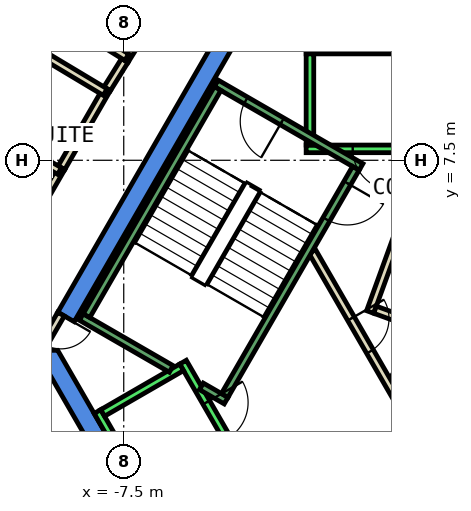
"""IFC4 building model, lengths in metres.
Left out: names, types, materials, properties, quantities, classifications, styles, units other than length and angle.
Written with IfcOpenShell. Run it as: python <this file> out.ifc"""

import sys

from ifc_helpers import new_model, si_unit, direction, frame, frame_2d, origin, place, context, subcontext, project, spatial, polyline, rectangle, outline, extrude, element, fill, save


model = new_model("IFC4")
c1 = context("Model", 3, precision=1e-05, world=origin(), true_north=direction((0.0, 1.0)))
c2 = subcontext(c1, "Body", "Model", "MODEL_VIEW")
j1 = project(units=[si_unit("LENGTHUNIT", "METRE"), si_unit("PLANEANGLEUNIT", "RADIAN")], contexts=[c1])
p1 = place(None, origin())
s1 = spatial("IfcSite", under=j1, at=p1, CompositionType="ELEMENT")
p2 = place(p1, origin())
s2 = spatial("IfcBuilding", under=s1, at=p2, CompositionType="ELEMENT")
p3 = place(p2, frame((0.0, 0.0, 286.4)))
s3 = spatial("IfcBuildingStorey", under=s2, at=p3, CompositionType="ELEMENT", Elevation=286.4)
p4 = place(p3, frame((0.0, 0.0, -0.6)))
e1 = element("IfcWall", 1, at=p4, inside=s3, PredefinedType="SHEAR", context=c2, shape_type="SweptSolid", body=[
    extrude(outline(polyline([(-9.236, 3.502), (-8.803, 3.253), (-4.619, 10.5), (-4.907, 11.0), (-9.236, 3.502)])), origin(), (0.0, 0.0, 1.0), 3.86),
])
p5 = place(p3, frame((0.0, 0.0, -0.6)))
e2 = element("IfcWall", 2, at=p5, inside=s3, PredefinedType="SHEAR", context=c2, shape_type="SweptSolid", body=[
    extrude(outline(polyline([(-9.815, 2.5), (-4.907, -6.0), (-4.619, -5.5), (-9.238, 2.5), (-9.815, 2.5)])), origin(), (0.0, 0.0, 1.0), 3.86),
])
p6 = place(p3, frame((-0.196, 5.764, 0.0), z_axis=(0.0, 0.0, 1.0), x_axis=(-0.34165322761, -0.939826086073, 0.0)))
e3 = element("IfcWall", 3, at=p6, inside=s3, PredefinedType="PARTITIONING", context=c2, shape_type="SweptSolid", body=[
    extrude(rectangle(XDim=2.4, YDim=0.2, at=frame_2d((1.2, 0.0))), origin(), (0.0, 0.0, 1.0), 3.26),
])
p7 = place(p3, frame((-0.888, 3.568, 0.0), z_axis=(0.0, 0.0, 1.0), x_axis=(0.939685034098, -0.34204098686, 0.0)))
e4 = element("IfcWall", 4, at=p7, inside=s3, PredefinedType="PARTITIONING", context=c2, shape_type="SweptSolid", body=[
    extrude(rectangle(XDim=2.237, YDim=0.2, at=frame_2d((1.119, 0.0))), origin(), (0.0, 0.0, 1.0), 3.26),
])
p8 = place(p3, frame((-7.937, 9.38, 0.0), z_axis=(0.0, 0.0, 1.0), x_axis=(0.52850186976, 0.848932137252, 0.0)))
e5 = element("IfcWall", 5, at=p8, inside=s3, PredefinedType="PARTITIONING", context=c2, shape_type="SweptSolid", body=[
    extrude(rectangle(XDim=0.88, YDim=0.2, at=frame_2d((0.44, 0.0))), origin(), (0.0, 0.0, 1.0), 3.26),
])
p9 = place(p3, frame((-7.472, 10.127, 0.0), z_axis=(0.0, 0.0, 1.0), x_axis=(0.527707224705, 0.849426326996, 0.0)))
e6 = element("IfcWall", 6, at=p9, inside=s3, PredefinedType="PARTITIONING", context=c2, shape_type="SweptSolid", body=[
    extrude(rectangle(XDim=3.0, YDim=0.2, at=frame_2d((1.5, 0.0))), origin(), (0.0, 0.0, 1.0), 3.26),
])
p10 = place(p3, frame((-12.082, 2.207, 0.0), z_axis=(0.0, 0.0, 1.0), x_axis=(0.500123454404, 0.865954115618, 0.0)))
e7 = element("IfcWall", 7, at=p10, inside=s3, PredefinedType="PARTITIONING", context=c2, shape_type="SweptSolid", body=[
    extrude(rectangle(XDim=5.885, YDim=0.2, at=frame_2d((2.942, 0.0))), origin(), (0.0, 0.0, 1.0), 3.26),
])
p11 = place(p10, frame((2.493, 0.0, 0.0)))
e8 = element("IfcOpeningElement", 8, at=p11, cuts=e7, PredefinedType="OPENING", context=c2, shape_type="SweptSolid", body=[
    extrude(rectangle(XDim=1.0, YDim=2.1, at=frame_2d((0.5, 1.05))), frame((0.0, 0.11, 0.0), z_axis=(0.0, -1.0, 0.0), x_axis=(1.0, 0.0, 0.0)), (0.0, 0.0, 1.0), 0.22),
])
p12 = place(p3, frame((-9.139, 7.303, 0.0), z_axis=(0.0, 0.0, 1.0), x_axis=(0.499869187296, 0.866100915363, 0.0)))
e9 = element("IfcWall", 9, at=p12, inside=s3, PredefinedType="PARTITIONING", context=c2, shape_type="SweptSolid", body=[
    extrude(rectangle(XDim=2.401, YDim=0.2, at=frame_2d((1.2, 0.0))), origin(), (0.0, 0.0, 1.0), 3.26),
])
p13 = place(p3, frame((-0.982, -1.0, 0.0), z_axis=(0.0, 0.0, 1.0), x_axis=(0.50024047865, 0.865886518847, 0.0)))
e10 = element("IfcWall", 10, at=p13, inside=s3, PredefinedType="PARTITIONING", context=c2, shape_type="SweptSolid", body=[
    extrude(rectangle(XDim=1.863, YDim=0.2, at=frame_2d((0.931, 0.0))), origin(), (0.0, 0.0, 1.0), 3.26),
])
p14 = place(p3, frame((-2.54, 5.1, 0.0), z_axis=(0.0, 0.0, 1.0), x_axis=(0.499925051871, -0.866068670783, 0.0)))
e11 = element("IfcWall", 11, at=p14, inside=s3, PredefinedType="PARTITIONING", context=c2, shape_type="SweptSolid", body=[
    extrude(rectangle(XDim=5.181, YDim=0.2, at=frame_2d((2.59, 0.0))), origin(), (0.0, 0.0, 1.0), 3.26),
])
p15 = place(p14, frame((2.04, 0.0, 0.0)))
e12 = element("IfcOpeningElement", 12, at=p15, cuts=e11, PredefinedType="OPENING", context=c2, shape_type="SweptSolid", body=[
    extrude(rectangle(XDim=1.0, YDim=2.1, at=frame_2d((0.5, 1.05))), frame((0.0, 0.11, 0.0), z_axis=(0.0, -1.0, 0.0), x_axis=(1.0, 0.0, 0.0)), (0.0, 0.0, 1.0), 0.22),
])
p16 = place(p3, frame((-9.543, 11.531, 0.0), z_axis=(0.0, 0.0, 1.0), x_axis=(0.849400119549, -0.527749407305, 0.0)))
e13 = element("IfcWall", 13, at=p16, inside=s3, PredefinedType="PARTITIONING", context=c2, shape_type="SweptSolid", body=[
    extrude(rectangle(XDim=2.5, YDim=0.2, at=frame_2d((1.25, 0.0))), origin(), (0.0, 0.0, 1.0), 3.26),
])
for number, where, z_axis, x_axis in (
    (14, (-7.989, 9.295, 0.0), (0.0, 0.0, 1.0), (-0.858, 0.514, 0.0)),
    (15, (-11.181, 8.367, 0.0), (0.0, 0.0, 1.0), (0.866, -0.5, 0.0)),
):
    element("IfcWall", number, at=place(p3, frame(where, z_axis=z_axis, x_axis=x_axis)), inside=s3, PredefinedType="PARTITIONING", context=c2, shape_type="SweptSolid", body=[
        extrude(rectangle(XDim=2.3, YDim=0.2, at=frame_2d((1.15, 0.0))), origin(), (0.0, 0.0, 1.0), 3.26),
    ])
p17 = place(p3, frame((-9.15, 3.452, 0.0), z_axis=(0.0, 0.0, 1.0), x_axis=(-0.500079945886, -0.865979242085, 0.0)))
e16 = element("IfcWall", 16, at=p17, inside=s3, PredefinedType="PARTITIONING", context=c2, shape_type="SweptSolid", body=[
    extrude(rectangle(XDim=0.926, YDim=0.2, at=frame_2d((0.463, 0.0))), origin(), (0.0, 0.0, 1.0), 2.4),
])
p18 = place(p17, frame((0.017, 0.0, 0.0)))
e17 = element("IfcOpeningElement", 17, at=p18, cuts=e16, PredefinedType="OPENING", context=c2, shape_type="SweptSolid", body=[
    extrude(rectangle(XDim=0.9, YDim=2.1, at=frame_2d((0.45, 1.05))), frame((0.0, 0.11, 0.0), z_axis=(0.0, -1.0, 0.0), x_axis=(1.0, 0.0, 0.0)), (0.0, 0.0, 1.0), 0.22),
])
p19 = place(p3, frame((2.7, 7.8, 0.0), z_axis=(0.0, 0.0, 1.0), x_axis=(-1.0, 0.0, 0.0)))
e18 = element("IfcWall", 18, at=p19, inside=s3, PredefinedType="STANDARD", context=c2, shape_type="SweptSolid", body=[
    extrude(rectangle(XDim=5.4, YDim=0.2, at=frame_2d((2.7, 0.0))), origin(), (0.0, 0.0, 1.0), 3.26),
])
p20 = place(p19, frame((1.225, 0.0, 0.0)))
e19 = element("IfcOpeningElement", 19, at=p20, cuts=e18, PredefinedType="OPENING", context=c2, shape_type="SweptSolid", body=[
    extrude(rectangle(XDim=1.1, YDim=2.1, at=frame_2d((0.55, 1.05))), frame((0.0, 0.11, 0.0), z_axis=(0.0, -1.0, 0.0), x_axis=(1.0, 0.0, 0.0)), (0.0, 0.0, 1.0), 0.22),
])
p21 = place(p19, frame((3.075, 0.0, 0.0)))
e20 = element("IfcOpeningElement", 20, at=p21, cuts=e18, PredefinedType="OPENING", context=c2, shape_type="SweptSolid", body=[
    extrude(rectangle(XDim=1.1, YDim=2.1, at=frame_2d((0.55, 1.05))), frame((0.0, 0.11, 0.0), z_axis=(0.0, -1.0, 0.0), x_axis=(1.0, 0.0, 0.0)), (0.0, 0.0, 1.0), 0.22),
])
p22 = place(p3, frame((2.7, 10.4, 0.0), z_axis=(0.0, 0.0, 1.0), x_axis=(-1.0, 0.0, 0.0)))
e21 = element("IfcWall", 21, at=p22, inside=s3, PredefinedType="STANDARD", context=c2, shape_type="SweptSolid", body=[
    extrude(rectangle(XDim=5.4, YDim=0.2, at=frame_2d((2.7, 0.0))), origin(), (0.0, 0.0, 1.0), 3.26),
])
p23 = place(p3, frame((-2.6, 7.9, 0.0), z_axis=(0.0, 0.0, 1.0), x_axis=(0.0, 1.0, 0.0)))
e22 = element("IfcWall", 22, at=p23, inside=s3, PredefinedType="STANDARD", context=c2, shape_type="SweptSolid", body=[
    extrude(rectangle(XDim=2.4, YDim=0.2, at=frame_2d((1.2, 0.0))), origin(), (0.0, 0.0, 1.0), 3.26),
])
p24 = place(p3, frame((-5.94, 2.188, 0.0), z_axis=(0.0, 0.0, 1.0), x_axis=(0.500034260056, -0.866005622828, 0.0)))
e23 = element("IfcWall", 23, at=p24, inside=s3, PredefinedType="STANDARD", context=c2, shape_type="SweptSolid", body=[
    extrude(rectangle(XDim=5.399, YDim=0.2, at=frame_2d((2.7, 0.0))), origin(), (0.0, 0.0, 1.0), 3.26),
])
p25 = place(p24, frame((3.075, 0.0, 0.0)))
e24 = element("IfcOpeningElement", 24, at=p25, cuts=e23, PredefinedType="OPENING", context=c2, shape_type="SweptSolid", body=[
    extrude(rectangle(XDim=1.1, YDim=2.1, at=frame_2d((0.55, 1.05))), frame((0.0, 0.11, 0.0), z_axis=(0.0, -1.0, 0.0), x_axis=(1.0, 0.0, 0.0)), (0.0, 0.0, 1.0), 0.22),
])
p26 = place(p24, frame((1.225, 0.0, 0.0)))
e25 = element("IfcOpeningElement", 25, at=p26, cuts=e23, PredefinedType="OPENING", context=c2, shape_type="SweptSolid", body=[
    extrude(rectangle(XDim=1.1, YDim=2.1, at=frame_2d((0.55, 1.05))), frame((0.0, 0.11, 0.0), z_axis=(0.0, -1.0, 0.0), x_axis=(1.0, 0.0, 0.0)), (0.0, 0.0, 1.0), 0.22),
])
p27 = place(p3, frame((-8.192, 0.888, 0.0), z_axis=(0.0, 0.0, 1.0), x_axis=(0.500034260056, -0.866005622828, 0.0)))
e26 = element("IfcWall", 26, at=p27, inside=s3, PredefinedType="STANDARD", context=c2, shape_type="SweptSolid", body=[
    extrude(rectangle(XDim=5.399, YDim=0.2, at=frame_2d((2.7, 0.0))), origin(), (0.0, 0.0, 1.0), 3.26),
])
p28 = place(p3, frame((-5.977, 2.052, 0.0), z_axis=(0.0, 0.0, 1.0), x_axis=(-0.865973769406, -0.500089422704, 0.0)))
e27 = element("IfcWall", 27, at=p28, inside=s3, PredefinedType="STANDARD", context=c2, shape_type="SweptSolid", body=[
    extrude(rectangle(XDim=2.399, YDim=0.2, at=frame_2d((1.2, 0.0))), origin(), (0.0, 0.0, 1.0), 3.26),
])
p29 = place(p3, frame((-1.256, 7.324, 0.0), z_axis=(0.0, 0.0, 1.0), x_axis=(-0.866046073146, 0.499964197906, 0.0)))
e28 = element("IfcWall", 28, at=p29, inside=s3, PredefinedType="STANDARD", context=c2, shape_type="SweptSolid", body=[
    extrude(rectangle(XDim=4.4, YDim=0.2, at=frame_2d((2.2, 0.0))), origin(), (0.0, 0.0, 1.0), 3.26),
])
p30 = place(p29, frame((2.4, 0.0, 0.0)))
e29 = element("IfcOpeningElement", 29, at=p30, cuts=e28, PredefinedType="OPENING", context=c2, shape_type="SweptSolid", body=[
    extrude(rectangle(XDim=1.1, YDim=2.2, at=frame_2d((0.55, 1.1))), frame((0.0, 0.11, 0.0), z_axis=(0.0, -1.0, 0.0), x_axis=(1.0, 0.0, 0.0)), (0.0, 0.0, 1.0), 0.22),
])
p31 = place(p3, frame((-6.25, 2.01, 0.0), z_axis=(0.0, 0.0, 1.0), x_axis=(-0.86611865017, 0.499838457731, 0.0)))
e30 = element("IfcWall", 30, at=p31, inside=s3, PredefinedType="STANDARD", context=c2, shape_type="SweptSolid", body=[
    extrude(rectangle(XDim=2.733, YDim=0.2, at=frame_2d((1.366, 0.0))), origin(), (0.0, 0.0, 1.0), 3.26),
])
p32 = place(p3, frame((-4.806, 1.176, 0.0), z_axis=(0.0, 0.0, 1.0), x_axis=(-0.866558586415, 0.499075361355, 0.0)))
e31 = element("IfcWall", 31, at=p32, inside=s3, PredefinedType="STANDARD", context=c2, shape_type="SweptSolid", body=[
    extrude(rectangle(XDim=0.751, YDim=0.2, at=frame_2d((0.376, 0.0))), origin(), (0.0, 0.0, 1.0), 3.26),
])
p33 = place(p3, frame((-1.393, 7.288, 0.0), z_axis=(0.0, 0.0, 1.0), x_axis=(-0.499963383562, -0.866046543262, 0.0)))
e32 = element("IfcWall", 32, at=p33, inside=s3, PredefinedType="STANDARD", context=c2, shape_type="SweptSolid", body=[
    extrude(rectangle(XDim=6.9, YDim=0.2, at=frame_2d((3.45, 0.0))), origin(), (0.0, 0.0, 1.0), 3.26),
])
p34 = place(p33, frame((0.45, 0.0, 0.0)))
e33 = element("IfcOpeningElement", 33, at=p34, cuts=e32, PredefinedType="OPENING", context=c2, shape_type="SweptSolid", body=[
    extrude(rectangle(XDim=1.1, YDim=2.2, at=frame_2d((0.55, 1.1))), frame((0.0, 0.11, 0.0), z_axis=(0.0, -1.0, 0.0), x_axis=(1.0, 0.0, 0.0)), (0.0, 0.0, 1.0), 0.22),
])
p35 = place(p3, frame((-5.03, 9.388, 0.0), z_axis=(0.0, 0.0, 1.0), x_axis=(-0.499978703459, -0.866037698999, 0.0)))
e34 = element("IfcWall", 34, at=p35, inside=s3, PredefinedType="STANDARD", context=c2, shape_type="SweptSolid", body=[
    extrude(rectangle(XDim=6.9, YDim=0.2, at=frame_2d((3.45, 0.0))), origin(), (0.0, 0.0, 1.0), 3.26),
])
p36 = place(p15, origin())
e35 = element("IfcDoor", 35, at=p36, inside=s3, OperationType="SINGLE_SWING_RIGHT", PredefinedType="DOOR", context=c2, shape_type="SweptSolid", body=[
    extrude(rectangle(XDim=1.0, YDim=2.1, at=frame_2d((0.5, 1.05))), frame((0.0, 0.025, 0.0), z_axis=(0.0, -1.0, 0.0), x_axis=(1.0, 0.0, 0.0)), (0.0, 0.0, 1.0), 0.05),
])
fill(e12, e35)
p37 = place(p18, origin())
e36 = element("IfcDoor", 36, at=p37, inside=s3, OperationType="SINGLE_SWING_LEFT", PredefinedType="DOOR", context=c2, shape_type="SweptSolid", body=[
    extrude(rectangle(XDim=0.9, YDim=2.1, at=frame_2d((0.45, 1.05))), frame((0.0, 0.025, 0.0), z_axis=(0.0, -1.0, 0.0), x_axis=(1.0, 0.0, 0.0)), (0.0, 0.0, 1.0), 0.05),
])
fill(e17, e36)
p38 = place(p21, origin())
e37 = element("IfcDoor", 37, at=p38, inside=s3, OperationType="SLIDING_TO_LEFT", PredefinedType="DOOR", context=c2, shape_type="SweptSolid", body=[
    extrude(rectangle(XDim=1.1, YDim=2.1, at=frame_2d((0.55, 1.05))), frame((0.0, 0.025, 0.0), z_axis=(0.0, -1.0, 0.0), x_axis=(1.0, 0.0, 0.0)), (0.0, 0.0, 1.0), 0.05),
])
fill(e20, e37)
p39 = place(p26, origin())
e38 = element("IfcDoor", 38, at=p39, inside=s3, OperationType="SLIDING_TO_LEFT", PredefinedType="DOOR", context=c2, shape_type="SweptSolid", body=[
    extrude(rectangle(XDim=1.1, YDim=2.1, at=frame_2d((0.55, 1.05))), frame((0.0, 0.025, 0.0), z_axis=(0.0, -1.0, 0.0), x_axis=(1.0, 0.0, 0.0)), (0.0, 0.0, 1.0), 0.05),
])
fill(e25, e38)
p40 = place(p34, origin())
e39 = element("IfcDoor", 39, at=p40, inside=s3, OperationType="SINGLE_SWING_LEFT", PredefinedType="DOOR", context=c2, shape_type="SweptSolid", body=[
    extrude(rectangle(XDim=1.1, YDim=2.2, at=frame_2d((0.55, 1.1))), frame((0.0, 0.025, 0.0), z_axis=(0.0, -1.0, 0.0), x_axis=(1.0, 0.0, 0.0)), (0.0, 0.0, 1.0), 0.05),
])
fill(e33, e39)
p41 = place(p30, origin())
e40 = element("IfcDoor", 40, at=p41, inside=s3, OperationType="SINGLE_SWING_LEFT", PredefinedType="DOOR", context=c2, shape_type="SweptSolid", body=[
    extrude(rectangle(XDim=1.1, YDim=2.2, at=frame_2d((0.55, 1.1))), frame((0.0, 0.025, 0.0), z_axis=(0.0, -1.0, 0.0), x_axis=(1.0, 0.0, 0.0)), (0.0, 0.0, 1.0), 0.05),
])
fill(e29, e40)
save(model, sys.argv[1])
